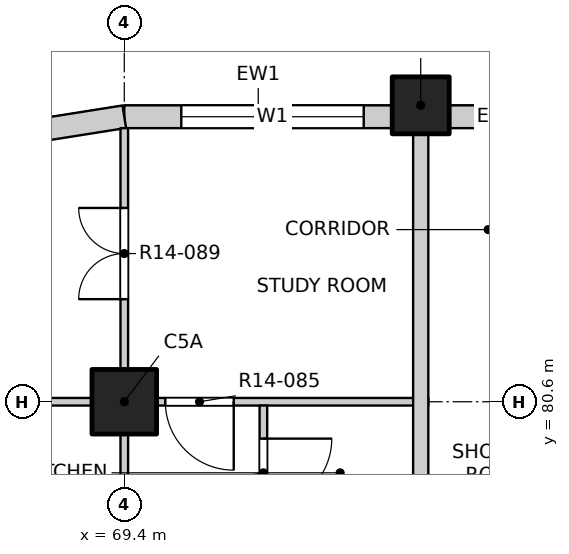
"""IFC4 building model, lengths in metres.
Left out: names, types, materials, properties, quantities, classifications, styles, units other than length and angle.
Written with IfcOpenShell. Run it as: python <this file> out.ifc"""

import sys

from ifc_helpers import new_model, si_unit, direction, frame, frame_2d, origin, origin_2d, place, context, subcontext, project, spatial, rectangle, extrude, element, fill, save


model = new_model("IFC4")
c1 = context("Model", 3, precision=1e-05, world=origin(), true_north=direction((0.0, 1.0)))
c2 = subcontext(c1, "Body", "Model", "MODEL_VIEW")
j1 = project(units=[si_unit("LENGTHUNIT", "METRE"), si_unit("PLANEANGLEUNIT", "RADIAN")], contexts=[c1])
p1 = place(None, origin())
s1 = spatial("IfcSite", under=j1, at=p1, CompositionType="ELEMENT")
p2 = place(p1, origin())
s2 = spatial("IfcBuilding", under=s1, at=p2, CompositionType="ELEMENT")
p3 = place(p2, frame((0.0, 0.0, 155.4)))
s3 = spatial("IfcBuildingStorey", under=s2, at=p3, CompositionType="ELEMENT", Elevation=155.4)
p4 = place(p3, frame((73.3, 84.5, -0.25), z_axis=(0.0, 0.0, 1.0), x_axis=(1.0, 0.0, 0.0)))
e1 = element("IfcColumn", 1, at=p4, inside=s3, PredefinedType="COLUMN", context=c2, shape_type="SweptSolid", body=[
    extrude(rectangle(XDim=0.75, YDim=0.75, at=origin_2d()), origin(), (0.0, 0.0, 1.0), 3.4),
])
p5 = place(p3, frame((69.4, 80.6, -0.25), z_axis=(0.0, 0.0, 1.0), x_axis=(1.0, 0.0, 0.0)))
e2 = element("IfcColumn", 2, at=p5, inside=s3, PredefinedType="COLUMN", context=c2, shape_type="SweptSolid", body=[
    extrude(rectangle(XDim=0.85, YDim=0.85, at=origin_2d()), origin(), (0.0, 0.0, 1.0), 3.4),
])
p6 = place(p3, frame((69.4, 84.35, 0.0), z_axis=(0.0, 0.0, 1.0), x_axis=(1.0, 0.0, 0.0)))
e3 = element("IfcWall", 3, at=p6, inside=s3, PredefinedType="SOLIDWALL", context=c2, shape_type="SweptSolid", body=[
    extrude(rectangle(XDim=3.525, YDim=0.3, at=frame_2d((1.763, 0.0))), origin(), (0.0, 0.0, 1.0), 2.7),
])
p7 = place(p6, frame((0.75, 0.0, 0.9)))
e4 = element("IfcOpeningElement", 4, at=p7, cuts=e3, PredefinedType="OPENING", context=c2, shape_type="SweptSolid", body=[
    extrude(rectangle(XDim=2.4, YDim=1.8, at=frame_2d((1.2, 0.9))), frame((0.0, 0.16, 0.0), z_axis=(0.0, -1.0, 0.0), x_axis=(1.0, 0.0, 0.0)), (0.0, 0.0, 1.0), 0.32),
])
p8 = place(p3, frame((73.675, 84.35, 0.0), z_axis=(0.0, 0.0, 1.0), x_axis=(1.0, 0.0, 0.0)))
e5 = element("IfcWall", 5, at=p8, inside=s3, PredefinedType="SOLIDWALL", context=c2, shape_type="SweptSolid", body=[
    extrude(rectangle(XDim=1.3, YDim=0.3, at=frame_2d((0.65, 0.0))), origin(), (0.0, 0.0, 1.0), 2.7),
])
p9 = place(p3, frame((69.4, 84.35, 0.0), z_axis=(0.0, 0.0, 1.0), x_axis=(-0.987678452879, -0.156496880861, 0.0)))
e6 = element("IfcWall", 6, at=p9, inside=s3, PredefinedType="SOLIDWALL", context=c2, shape_type="SweptSolid", body=[
    extrude(rectangle(XDim=1.173, YDim=0.3, at=frame_2d((0.586, 0.0))), origin(), (0.0, 0.0, 1.0), 2.7),
])
p10 = place(p3, frame((65.8, 80.6, 0.0), z_axis=(0.0, 0.0, 1.0), x_axis=(1.0, 0.0, 0.0)))
e7 = element("IfcWall", 7, at=p10, inside=s3, PredefinedType="PARTITIONING", context=c2, shape_type="SweptSolid", body=[
    extrude(rectangle(XDim=7.6, YDim=0.1, at=frame_2d((3.8, 0.0))), origin(), (0.0, 0.0, 1.0), 3.15),
])
p11 = place(p10, frame((4.14, 0.0, 0.0)))
e8 = element("IfcOpeningElement", 8, at=p11, cuts=e7, PredefinedType="OPENING", context=c2, shape_type="SweptSolid", body=[
    extrude(rectangle(XDim=0.9, YDim=2.1, at=frame_2d((0.45, 1.05))), frame((0.0, 0.06, 0.0), z_axis=(0.0, -1.0, 0.0), x_axis=(1.0, 0.0, 0.0)), (0.0, 0.0, 1.0), 0.12),
])
p12 = place(p3, frame((69.4, 45.8, 0.0), z_axis=(0.0, 0.0, 1.0), x_axis=(0.0, 1.0, 0.0)))
e9 = element("IfcWall", 9, at=p12, inside=s3, PredefinedType="PARTITIONING", context=c2, shape_type="SweptSolid", body=[
    extrude(rectangle(XDim=38.4, YDim=0.1, at=frame_2d((19.2, 0.0))), origin(), (0.0, 0.0, 1.0), 3.15),
])
p13 = place(p12, frame((1.05, 0.0, 0.0)))
e10 = element("IfcOpeningElement", 10, at=p13, cuts=e9, PredefinedType="OPENING", context=c2, shape_type="SweptSolid", body=[
    extrude(rectangle(XDim=1.2, YDim=2.1, at=frame_2d((0.6, 1.05))), frame((0.0, 0.06, 0.0), z_axis=(0.0, -1.0, 0.0), x_axis=(1.0, 0.0, 0.0)), (0.0, 0.0, 1.0), 0.12),
])
p14 = place(p12, frame((6.9, 0.0, 0.0)))
e11 = element("IfcOpeningElement", 11, at=p14, cuts=e9, PredefinedType="OPENING", context=c2, shape_type="SweptSolid", body=[
    extrude(rectangle(XDim=1.2, YDim=2.1, at=frame_2d((0.6, 1.05))), frame((0.0, 0.06, 0.0), z_axis=(0.0, -1.0, 0.0), x_axis=(1.0, 0.0, 0.0)), (0.0, 0.0, 1.0), 0.12),
])
p15 = place(p12, frame((12.9, 0.0, 0.0)))
e12 = element("IfcOpeningElement", 12, at=p15, cuts=e9, PredefinedType="OPENING", context=c2, shape_type="SweptSolid", body=[
    extrude(rectangle(XDim=0.9, YDim=2.1, at=frame_2d((0.45, 1.05))), frame((0.0, 0.06, 0.0), z_axis=(0.0, -1.0, 0.0), x_axis=(1.0, 0.0, 0.0)), (0.0, 0.0, 1.0), 0.12),
])
p16 = place(p12, frame((16.8, 0.0, 0.0)))
e13 = element("IfcOpeningElement", 13, at=p16, cuts=e9, PredefinedType="OPENING", context=c2, shape_type="SweptSolid", body=[
    extrude(rectangle(XDim=0.9, YDim=2.1, at=frame_2d((0.45, 1.05))), frame((0.0, 0.06, 0.0), z_axis=(0.0, -1.0, 0.0), x_axis=(1.0, 0.0, 0.0)), (0.0, 0.0, 1.0), 0.12),
])
p17 = place(p12, frame((20.7, 0.0, 0.0)))
e14 = element("IfcOpeningElement", 14, at=p17, cuts=e9, PredefinedType="OPENING", context=c2, shape_type="SweptSolid", body=[
    extrude(rectangle(XDim=0.9, YDim=2.1, at=frame_2d((0.45, 1.05))), frame((0.0, 0.06, 0.0), z_axis=(0.0, -1.0, 0.0), x_axis=(1.0, 0.0, 0.0)), (0.0, 0.0, 1.0), 0.12),
])
p18 = place(p12, frame((24.6, 0.0, 0.0)))
e15 = element("IfcOpeningElement", 15, at=p18, cuts=e9, PredefinedType="OPENING", context=c2, shape_type="SweptSolid", body=[
    extrude(rectangle(XDim=0.9, YDim=2.1, at=frame_2d((0.45, 1.05))), frame((0.0, 0.06, 0.0), z_axis=(0.0, -1.0, 0.0), x_axis=(1.0, 0.0, 0.0)), (0.0, 0.0, 1.0), 0.12),
])
p19 = place(p12, frame((28.5, 0.0, 0.0)))
e16 = element("IfcOpeningElement", 16, at=p19, cuts=e9, PredefinedType="OPENING", context=c2, shape_type="SweptSolid", body=[
    extrude(rectangle(XDim=0.9, YDim=2.1, at=frame_2d((0.45, 1.05))), frame((0.0, 0.06, 0.0), z_axis=(0.0, -1.0, 0.0), x_axis=(1.0, 0.0, 0.0)), (0.0, 0.0, 1.0), 0.12),
])
p20 = place(p12, frame((32.4, 0.0, 0.0)))
e17 = element("IfcOpeningElement", 17, at=p20, cuts=e9, PredefinedType="OPENING", context=c2, shape_type="SweptSolid", body=[
    extrude(rectangle(XDim=0.9, YDim=2.1, at=frame_2d((0.45, 1.05))), frame((0.0, 0.06, 0.0), z_axis=(0.0, -1.0, 0.0), x_axis=(1.0, 0.0, 0.0)), (0.0, 0.0, 1.0), 0.12),
])
p21 = place(p12, frame((36.15, 0.0, 0.0)))
e18 = element("IfcOpeningElement", 18, at=p21, cuts=e9, PredefinedType="OPENING", context=c2, shape_type="SweptSolid", body=[
    extrude(rectangle(XDim=1.2, YDim=2.1, at=frame_2d((0.6, 1.05))), frame((0.0, 0.06, 0.0), z_axis=(0.0, -1.0, 0.0), x_axis=(1.0, 0.0, 0.0)), (0.0, 0.0, 1.0), 0.12),
])
p22 = place(p3, frame((71.23, 75.95, 0.0), z_axis=(0.0, 0.0, 1.0), x_axis=(0.0, 1.0, 0.0)))
e19 = element("IfcWall", 19, at=p22, inside=s3, PredefinedType="PARTITIONING", context=c2, shape_type="SweptSolid", body=[
    extrude(rectangle(XDim=4.6, YDim=0.1, at=frame_2d((2.3, 0.0))), origin(), (0.0, 0.0, 1.0), 3.15),
])
p23 = place(p22, frame((0.29, 0.0, 0.0)))
e20 = element("IfcOpeningElement", 20, at=p23, cuts=e19, PredefinedType="OPENING", context=c2, shape_type="SweptSolid", body=[
    extrude(rectangle(XDim=0.8, YDim=2.1, at=frame_2d((0.4, 1.05))), frame((0.0, 0.06, 0.0), z_axis=(0.0, -1.0, 0.0), x_axis=(1.0, 0.0, 0.0)), (0.0, 0.0, 1.0), 0.12),
])
p24 = place(p22, frame((1.655, 0.0, 0.0)))
e21 = element("IfcOpeningElement", 21, at=p24, cuts=e19, PredefinedType="OPENING", context=c2, shape_type="SweptSolid", body=[
    extrude(rectangle(XDim=0.9, YDim=2.1, at=frame_2d((0.45, 1.05))), frame((0.0, 0.06, 0.0), z_axis=(0.0, -1.0, 0.0), x_axis=(1.0, 0.0, 0.0)), (0.0, 0.0, 1.0), 0.12),
])
p25 = place(p22, frame((3.265, 0.0, 0.0)))
e22 = element("IfcOpeningElement", 22, at=p25, cuts=e19, PredefinedType="OPENING", context=c2, shape_type="SweptSolid", body=[
    extrude(rectangle(XDim=0.9, YDim=2.1, at=frame_2d((0.45, 1.05))), frame((0.0, 0.06, 0.0), z_axis=(0.0, -1.0, 0.0), x_axis=(1.0, 0.0, 0.0)), (0.0, 0.0, 1.0), 0.12),
])
p26 = place(p3, frame((73.3, 49.5, 0.0), z_axis=(0.0, 0.0, 1.0), x_axis=(0.0, 1.0, 0.0)))
e23 = element("IfcWall", 23, at=p26, inside=s3, PredefinedType="PARTITIONING", context=c2, shape_type="SweptSolid", body=[
    extrude(rectangle(XDim=34.7, YDim=0.2, at=frame_2d((17.35, 0.0))), origin(), (0.0, 0.0, 1.0), 3.15),
])
p27 = place(p26, frame((10.125, 0.0, 0.0)))
e24 = element("IfcOpeningElement", 24, at=p27, cuts=e23, PredefinedType="OPENING", context=c2, shape_type="SweptSolid", body=[
    extrude(rectangle(XDim=1.0, YDim=2.1, at=frame_2d((0.5, 1.05))), frame((0.0, 0.11, 0.0), z_axis=(0.0, -1.0, 0.0), x_axis=(1.0, 0.0, 0.0)), (0.0, 0.0, 1.0), 0.22),
])
p28 = place(p26, frame((14.575, 0.0, 0.0)))
e25 = element("IfcOpeningElement", 25, at=p28, cuts=e23, PredefinedType="OPENING", context=c2, shape_type="SweptSolid", body=[
    extrude(rectangle(XDim=1.0, YDim=2.1, at=frame_2d((0.5, 1.05))), frame((0.0, 0.11, 0.0), z_axis=(0.0, -1.0, 0.0), x_axis=(1.0, 0.0, 0.0)), (0.0, 0.0, 1.0), 0.22),
])
p29 = place(p26, frame((26.575, 0.0, 0.0)))
e26 = element("IfcOpeningElement", 26, at=p29, cuts=e23, PredefinedType="OPENING", context=c2, shape_type="SweptSolid", body=[
    extrude(rectangle(XDim=1.0, YDim=2.1, at=frame_2d((0.5, 1.05))), frame((0.0, 0.11, 0.0), z_axis=(0.0, -1.0, 0.0), x_axis=(1.0, 0.0, 0.0)), (0.0, 0.0, 1.0), 0.22),
])
p30 = place(p7, origin())
e27 = element("IfcWindow", 27, at=p30, inside=s3, PartitioningType="DOUBLE_PANEL_VERTICAL", PredefinedType="WINDOW", context=c2, shape_type="SweptSolid", body=[
    extrude(rectangle(XDim=2.4, YDim=1.8, at=frame_2d((1.2, 0.9))), frame((0.0, 0.03, 0.0), z_axis=(0.0, -1.0, 0.0), x_axis=(1.0, 0.0, 0.0)), (0.0, 0.0, 1.0), 0.06),
])
fill(e4, e27)
p31 = place(p25, origin())
e28 = element("IfcDoor", 28, at=p31, inside=s3, OperationType="SINGLE_SWING_LEFT", PredefinedType="DOOR", context=c2, shape_type="SweptSolid", body=[
    extrude(rectangle(XDim=0.9, YDim=2.1, at=frame_2d((0.45, 1.05))), frame((0.0, 0.025, 0.0), z_axis=(0.0, -1.0, 0.0), x_axis=(1.0, 0.0, 0.0)), (0.0, 0.0, 1.0), 0.05),
])
fill(e22, e28)
p32 = place(p11, origin())
e29 = element("IfcDoor", 29, at=p32, inside=s3, OperationType="SINGLE_SWING_LEFT", PredefinedType="DOOR", context=c2, shape_type="SweptSolid", body=[
    extrude(rectangle(XDim=0.9, YDim=2.1, at=frame_2d((0.45, 1.05))), frame((0.0, 0.025, 0.0), z_axis=(0.0, -1.0, 0.0), x_axis=(1.0, 0.0, 0.0)), (0.0, 0.0, 1.0), 0.05),
])
fill(e8, e29)
p33 = place(p21, origin())
e30 = element("IfcDoor", 30, at=p33, inside=s3, OperationType="DOUBLE_DOOR_SINGLE_SWING", PredefinedType="DOOR", context=c2, shape_type="SweptSolid", body=[
    extrude(rectangle(XDim=1.2, YDim=2.1, at=frame_2d((0.6, 1.05))), frame((0.0, 0.025, 0.0), z_axis=(0.0, -1.0, 0.0), x_axis=(1.0, 0.0, 0.0)), (0.0, 0.0, 1.0), 0.05),
])
fill(e18, e30)
save(model, sys.argv[1])
